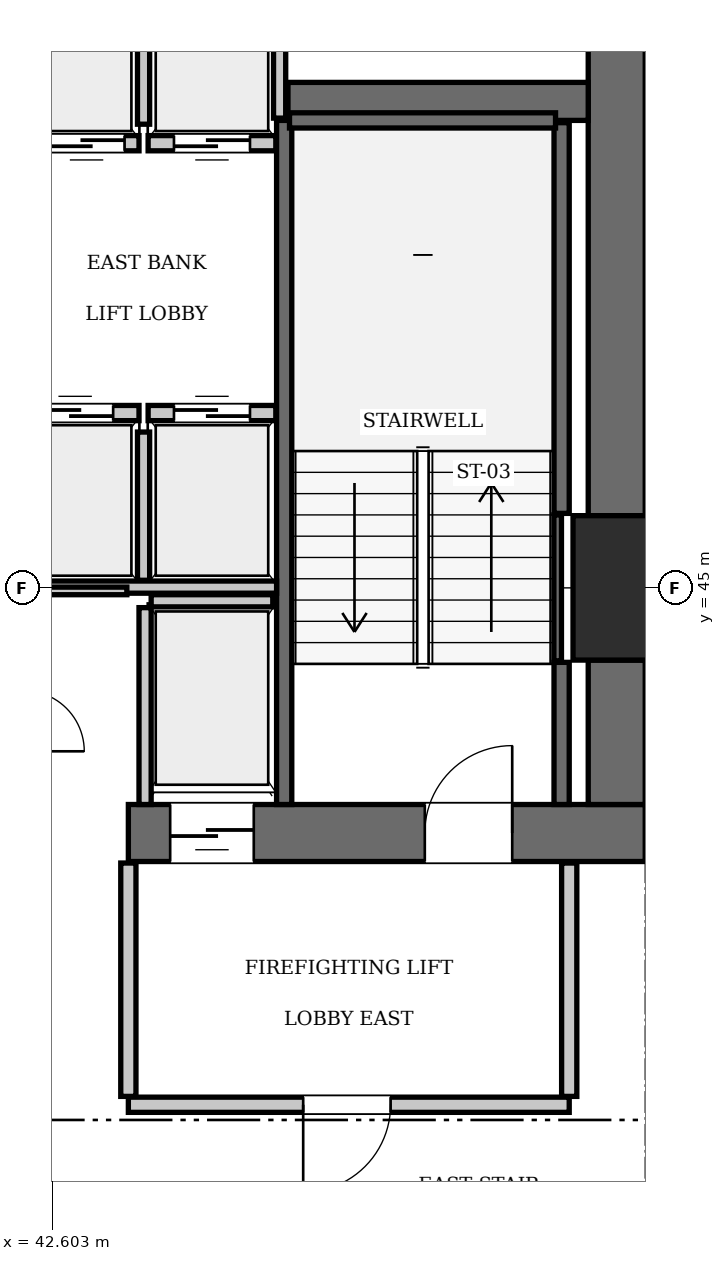
"""IFC4 building model, lengths in metres.
Left out: names, types, materials, properties, quantities, classifications, styles, units other than length and angle.
Written with IfcOpenShell. Run it as: python <this file> out.ifc"""

import sys

from ifc_helpers import new_model, si_unit, direction, frame, frame_2d, origin, origin_2d, place, context, subcontext, project, spatial, rectangle, extrude, element, fill, save


model = new_model("IFC4")
c1 = context("Model", 3, precision=1e-05, world=origin(), true_north=direction((0.0, 1.0)))
c2 = subcontext(c1, "Body", "Model", "MODEL_VIEW")
j1 = project(units=[si_unit("LENGTHUNIT", "METRE"), si_unit("PLANEANGLEUNIT", "RADIAN")], contexts=[c1])
p1 = place(None, origin())
s1 = spatial("IfcSite", under=j1, at=p1, CompositionType="ELEMENT")
p2 = place(p1, origin())
s2 = spatial("IfcBuilding", under=s1, at=p2, CompositionType="ELEMENT")
p3 = place(p2, frame((0.0, 0.0, 192.85)))
s3 = spatial("IfcBuildingStorey", under=s2, at=p3, CompositionType="ELEMENT", Elevation=192.85)
p4 = place(p3, frame((50.4, 45.0, 0.0), z_axis=(0.0, 0.0, 1.0), x_axis=(1.0, 0.0, 0.0)))
e1 = element("IfcColumn", 1, at=p4, inside=s3, PredefinedType="COLUMN", context=c2, shape_type="SweptSolid", body=[
    extrude(rectangle(XDim=1.9, YDim=1.9, at=origin_2d()), origin(), (0.0, 0.0, 1.0), 3.85),
])
p5 = place(p3, frame((43.6, 41.775, 0.0), z_axis=(0.0, 0.0, 1.0), x_axis=(1.0, 0.0, 0.0)))
e2 = element("IfcWall", 2, at=p5, inside=s3, PredefinedType="SHEAR", context=c2, shape_type="SweptSolid", body=[
    extrude(rectangle(XDim=6.8, YDim=0.75, at=frame_2d((3.4, 0.0))), origin(), (0.0, 0.0, 1.0), 3.85),
])
p6 = place(p5, frame((3.9, 0.0, 0.0)))
e3 = element("IfcOpeningElement", 3, at=p6, cuts=e2, PredefinedType="OPENING", context=c2, shape_type="SweptSolid", body=[
    extrude(rectangle(XDim=1.15, YDim=2.15, at=frame_2d((0.575, 1.075))), frame((0.0, 0.385, 0.0), z_axis=(0.0, -1.0, 0.0), x_axis=(1.0, 0.0, 0.0)), (0.0, 0.0, 1.0), 0.77),
])
p7 = place(p5, frame((0.55, 0.0, 0.0)))
e4 = element("IfcOpeningElement", 4, at=p7, cuts=e2, PredefinedType="OPENING", context=c2, shape_type="SweptSolid", body=[
    extrude(rectangle(XDim=1.1, YDim=2.2, at=frame_2d((0.55, 1.1))), frame((0.0, 0.385, 0.0), z_axis=(0.0, -1.0, 0.0), x_axis=(1.0, 0.0, 0.0)), (0.0, 0.0, 1.0), 0.77),
])
p8 = place(p3, frame((50.025, 42.15, 0.0), z_axis=(0.0, 0.0, 1.0), x_axis=(0.0, 1.0, 0.0)))
e5 = element("IfcWall", 5, at=p8, inside=s3, PredefinedType="SHEAR", context=c2, shape_type="SweptSolid", body=[
    extrude(rectangle(XDim=1.9, YDim=0.75, at=frame_2d((0.95, 0.0))), origin(), (0.0, 0.0, 1.0), 3.85),
])
p9 = place(p3, frame((50.025, 45.95, 0.0), z_axis=(0.0, 0.0, 1.0), x_axis=(0.0, 1.0, 0.0)))
e6 = element("IfcWall", 6, at=p9, inside=s3, PredefinedType="SHEAR", context=c2, shape_type="SweptSolid", body=[
    extrude(rectangle(XDim=7.3, YDim=0.75, at=frame_2d((3.65, 0.0))), origin(), (0.0, 0.0, 1.0), 3.85),
])
p10 = place(p3, frame((45.7, 51.4, 0.0), z_axis=(0.0, 0.0, 1.0), x_axis=(1.0, 0.0, 0.0)))
e7 = element("IfcWall", 7, at=p10, inside=s3, PredefinedType="SHEAR", context=c2, shape_type="SweptSolid", body=[
    extrude(rectangle(XDim=3.95, YDim=0.5, at=frame_2d((1.975, 0.0))), origin(), (0.0, 0.0, 1.0), 3.85),
])
p11 = place(p3, frame((45.65, 42.15, 0.0), z_axis=(0.0, 0.0, 1.0), x_axis=(0.0, 1.0, 0.0)))
e8 = element("IfcWall", 8, at=p11, inside=s3, PredefinedType="SOLIDWALL", context=c2, shape_type="SweptSolid", body=[
    extrude(rectangle(XDim=9.0, YDim=0.2, at=frame_2d((4.5, 0.0))), origin(), (0.0, 0.0, 1.0), 3.61),
])
p12 = place(p3, frame((49.3, 42.15, 0.0), z_axis=(0.0, 0.0, 1.0), x_axis=(0.0, 1.0, 0.0)))
e9 = element("IfcWall", 9, at=p12, inside=s3, PredefinedType="SOLIDWALL", context=c2, shape_type="SweptSolid", body=[
    extrude(rectangle(XDim=1.87, YDim=0.2, at=frame_2d((0.935, 0.0))), origin(), (0.0, 0.0, 1.0), 3.61),
])
p13 = place(p3, frame((49.3, 45.98, 0.0), z_axis=(0.0, 0.0, 1.0), x_axis=(0.0, 1.0, 0.0)))
e10 = element("IfcWall", 10, at=p13, inside=s3, PredefinedType="SOLIDWALL", context=c2, shape_type="SweptSolid", body=[
    extrude(rectangle(XDim=5.14, YDim=0.2, at=frame_2d((2.57, 0.0))), origin(), (0.0, 0.0, 1.0), 3.61),
])
p14 = place(p3, frame((45.72, 51.15, 0.0), z_axis=(0.0, 0.0, 1.0), x_axis=(1.0, 0.0, 0.0)))
e11 = element("IfcWall", 11, at=p14, inside=s3, PredefinedType="SOLIDWALL", context=c2, shape_type="SweptSolid", body=[
    extrude(rectangle(XDim=3.5, YDim=0.2, at=frame_2d((1.75, 0.0))), origin(), (0.0, 0.0, 1.0), 3.61),
])
p15 = place(p3, frame((49.248, 44.04, 0.0), z_axis=(0.0, 0.0, 1.0), x_axis=(0.0, 1.0, 0.0)))
e12 = element("IfcWall", 12, at=p15, inside=s3, PredefinedType="SOLIDWALL", context=c2, shape_type="SweptSolid", body=[
    extrude(rectangle(XDim=1.92, YDim=0.1, at=frame_2d((0.96, 0.0))), origin(), (0.0, 0.0, 1.0), 3.61),
])
p16 = place(p3, frame((42.06, 47.3, 0.0), z_axis=(0.0, 0.0, 1.0), x_axis=(1.0, 0.0, 0.0)))
e13 = element("IfcWall", 13, at=p16, inside=s3, PredefinedType="SOLIDWALL", context=c2, shape_type="SweptSolid", body=[
    extrude(rectangle(XDim=1.68, YDim=0.2, at=frame_2d((0.84, 0.0))), origin(), (0.0, 0.0, 1.0), 3.61),
])
p17 = place(p16, frame((0.34, 0.0, 0.0)))
e14 = element("IfcOpeningElement", 14, at=p17, cuts=e13, PredefinedType="OPENING", context=c2, shape_type="SweptSolid", body=[
    extrude(rectangle(XDim=1.0, YDim=2.15, at=frame_2d((0.5, 1.075))), frame((0.0, 0.11, 0.0), z_axis=(0.0, -1.0, 0.0), x_axis=(1.0, 0.0, 0.0)), (0.0, 0.0, 1.0), 0.22),
])
p18 = place(p3, frame((43.86, 47.3, 0.0), z_axis=(0.0, 0.0, 1.0), x_axis=(1.0, 0.0, 0.0)))
e15 = element("IfcWall", 15, at=p18, inside=s3, PredefinedType="SOLIDWALL", context=c2, shape_type="SweptSolid", body=[
    extrude(rectangle(XDim=1.68, YDim=0.2, at=frame_2d((0.84, 0.0))), origin(), (0.0, 0.0, 1.0), 3.61),
])
p19 = place(p18, frame((0.34, 0.0, 0.0)))
e16 = element("IfcOpeningElement", 16, at=p19, cuts=e15, PredefinedType="OPENING", context=c2, shape_type="SweptSolid", body=[
    extrude(rectangle(XDim=1.0, YDim=2.15, at=frame_2d((0.5, 1.075))), frame((0.0, 0.11, 0.0), z_axis=(0.0, -1.0, 0.0), x_axis=(1.0, 0.0, 0.0)), (0.0, 0.0, 1.0), 0.22),
])
p20 = place(p3, frame((42.36, 50.85, 0.0), z_axis=(0.0, 0.0, 1.0), x_axis=(1.0, 0.0, 0.0)))
e17 = element("IfcWall", 17, at=p20, inside=s3, PredefinedType="SOLIDWALL", context=c2, shape_type="SweptSolid", body=[
    extrude(rectangle(XDim=1.38, YDim=0.2, at=frame_2d((0.69, 0.0))), origin(), (0.0, 0.0, 1.0), 3.61),
])
p21 = place(p20, frame((0.19, 0.0, 0.0)))
e18 = element("IfcOpeningElement", 18, at=p21, cuts=e17, PredefinedType="OPENING", context=c2, shape_type="SweptSolid", body=[
    extrude(rectangle(XDim=1.0, YDim=2.15, at=frame_2d((0.5, 1.075))), frame((0.0, 0.11, 0.0), z_axis=(0.0, -1.0, 0.0), x_axis=(1.0, 0.0, 0.0)), (0.0, 0.0, 1.0), 0.22),
])
p22 = place(p3, frame((43.86, 50.85, 0.0), z_axis=(0.0, 0.0, 1.0), x_axis=(1.0, 0.0, 0.0)))
e19 = element("IfcWall", 19, at=p22, inside=s3, PredefinedType="SOLIDWALL", context=c2, shape_type="SweptSolid", body=[
    extrude(rectangle(XDim=1.68, YDim=0.2, at=frame_2d((0.84, 0.0))), origin(), (0.0, 0.0, 1.0), 3.61),
])
p23 = place(p22, frame((0.34, 0.0, 0.0)))
e20 = element("IfcOpeningElement", 20, at=p23, cuts=e19, PredefinedType="OPENING", context=c2, shape_type="SweptSolid", body=[
    extrude(rectangle(XDim=1.0, YDim=2.15, at=frame_2d((0.5, 1.075))), frame((0.0, 0.11, 0.0), z_axis=(0.0, -1.0, 0.0), x_axis=(1.0, 0.0, 0.0)), (0.0, 0.0, 1.0), 0.22),
])
p24 = place(p3, frame((43.9, 44.83, 0.0), z_axis=(0.0, 0.0, 1.0), x_axis=(1.0, 0.0, 0.0)))
e21 = element("IfcWall", 21, at=p24, inside=s3, PredefinedType="SOLIDWALL", context=c2, shape_type="SweptSolid", body=[
    extrude(rectangle(XDim=1.6, YDim=0.16, at=frame_2d((0.8, 0.0))), origin(), (0.0, 0.0, 1.0), 3.61),
])
p25 = place(p3, frame((43.82, 42.15, 0.0), z_axis=(0.0, 0.0, 1.0), x_axis=(0.0, 1.0, 0.0)))
e22 = element("IfcWall", 22, at=p25, inside=s3, PredefinedType="SOLIDWALL", context=c2, shape_type="SweptSolid", body=[
    extrude(rectangle(XDim=2.59, YDim=0.16, at=frame_2d((1.295, 0.0))), origin(), (0.0, 0.0, 1.0), 3.61),
])
p26 = place(p3, frame((43.8, 45.1, 0.0), z_axis=(0.0, 0.0, 1.0), x_axis=(0.0, 1.0, 0.0)))
e23 = element("IfcWall", 23, at=p26, inside=s3, PredefinedType="SOLIDWALL", context=c2, shape_type="SweptSolid", body=[
    extrude(rectangle(XDim=1.95, YDim=0.16, at=frame_2d((0.975, 0.0))), origin(), (0.0, 0.0, 1.0), 3.61),
])
p27 = place(p3, frame((42.1, 45.01, 0.0), z_axis=(0.0, 0.0, 1.0), x_axis=(1.0, 0.0, 0.0)))
e24 = element("IfcWall", 24, at=p27, inside=s3, PredefinedType="SOLIDWALL", context=c2, shape_type="SweptSolid", body=[
    extrude(rectangle(XDim=3.45, YDim=0.16, at=frame_2d((1.725, 0.0))), origin(), (0.0, 0.0, 1.0), 3.61),
])
p28 = place(p3, frame((45.59, 51.18, 0.0), z_axis=(0.0, 0.0, 1.0), x_axis=(0.0, 1.0, 0.0)))
e25 = element("IfcWall", 25, at=p28, inside=s3, PredefinedType="SOLIDWALL", context=c2, shape_type="SweptSolid", body=[
    extrude(rectangle(XDim=2.07, YDim=0.16, at=frame_2d((1.035, 0.0))), origin(), (0.0, 0.0, 1.0), 3.61),
])
p29 = place(p3, frame((43.8, 51.1, 0.0), z_axis=(0.0, 0.0, 1.0), x_axis=(0.0, 1.0, 0.0)))
e26 = element("IfcWall", 26, at=p29, inside=s3, PredefinedType="SOLIDWALL", context=c2, shape_type="SweptSolid", body=[
    extrude(rectangle(XDim=2.15, YDim=0.16, at=frame_2d((1.075, 0.0))), origin(), (0.0, 0.0, 1.0), 3.61),
])
p30 = place(p3, frame((43.6, 38.2, 0.0), z_axis=(0.0, 0.0, 1.0), x_axis=(1.0, 0.0, 0.0)))
e27 = element("IfcWall", 27, at=p30, inside=s3, PredefinedType="PARTITIONING", context=c2, shape_type="SweptSolid", body=[
    extrude(rectangle(XDim=5.8, YDim=0.2, at=frame_2d((2.9, 0.0))), origin(), (0.0, 0.0, 1.0), 3.61),
])
p31 = place(p30, frame((2.3, 0.0, 0.0)))
e28 = element("IfcOpeningElement", 28, at=p31, cuts=e27, PredefinedType="OPENING", context=c2, shape_type="SweptSolid", body=[
    extrude(rectangle(XDim=1.15, YDim=2.15, at=frame_2d((0.575, 1.075))), frame((0.0, 0.11, 0.0), z_axis=(0.0, -1.0, 0.0), x_axis=(1.0, 0.0, 0.0)), (0.0, 0.0, 1.0), 0.22),
])
for number, where, z_axis, x_axis in (
    (29, (43.6, 38.31, 0.0), (0.0, 0.0, 1.0), (0.0, 1.0, 0.0)),
    (30, (49.4, 38.31, 0.0), (0.0, 0.0, 1.0), (0.0, 1.0, 0.0)),
):
    element("IfcWall", number, at=place(p3, frame(where, z_axis=z_axis, x_axis=x_axis)), inside=s3, PredefinedType="PARTITIONING", context=c2, shape_type="SweptSolid", body=[
        extrude(rectangle(XDim=3.07, YDim=0.2, at=frame_2d((1.535, 0.0))), origin(), (0.0, 0.0, 1.0), 3.61),
    ])
p32 = place(p3, frame((42.28, 44.96, 0.0), z_axis=(0.0, 0.0, 1.0), x_axis=(1.0, 0.0, 0.0)))
e31 = element("IfcWall", 31, at=p32, inside=s3, PredefinedType="PARTITIONING", context=c2, shape_type="SweptSolid", body=[
    extrude(rectangle(XDim=1.3, YDim=0.1, at=frame_2d((0.65, 0.0))), origin(), (0.0, 0.0, 1.0), 3.61),
])
p33 = place(p6, origin())
e32 = element("IfcDoor", 32, at=p33, inside=s3, OperationType="SINGLE_SWING_RIGHT", PredefinedType="DOOR", context=c2, shape_type="SweptSolid", body=[
    extrude(rectangle(XDim=1.15, YDim=2.15, at=frame_2d((0.575, 1.075))), frame((0.0, 0.025, 0.0), z_axis=(0.0, -1.0, 0.0), x_axis=(1.0, 0.0, 0.0)), (0.0, 0.0, 1.0), 0.05),
])
fill(e3, e32)
p34 = place(p17, origin())
e33 = element("IfcDoor", 33, at=p34, inside=s3, OperationType="SLIDING_TO_LEFT", PredefinedType="DOOR", context=c2, shape_type="SweptSolid", body=[
    extrude(rectangle(XDim=1.0, YDim=2.15, at=frame_2d((0.5, 1.075))), frame((0.0, 0.025, 0.0), z_axis=(0.0, -1.0, 0.0), x_axis=(1.0, 0.0, 0.0)), (0.0, 0.0, 1.0), 0.05),
])
fill(e14, e33)
p35 = place(p19, origin())
e34 = element("IfcDoor", 34, at=p35, inside=s3, OperationType="SLIDING_TO_LEFT", PredefinedType="DOOR", context=c2, shape_type="SweptSolid", body=[
    extrude(rectangle(XDim=1.0, YDim=2.15, at=frame_2d((0.5, 1.075))), frame((0.0, 0.025, 0.0), z_axis=(0.0, -1.0, 0.0), x_axis=(1.0, 0.0, 0.0)), (0.0, 0.0, 1.0), 0.05),
])
fill(e16, e34)
p36 = place(p21, frame((1.0, 0.0, 0.0), z_axis=(0.0, 0.0, 1.0), x_axis=(-1.0, 0.0, 0.0)))
e35 = element("IfcDoor", 35, at=p36, inside=s3, OperationType="SLIDING_TO_LEFT", PredefinedType="DOOR", context=c2, shape_type="SweptSolid", body=[
    extrude(rectangle(XDim=1.0, YDim=2.15, at=frame_2d((0.5, 1.075))), frame((0.0, 0.025, 0.0), z_axis=(0.0, -1.0, 0.0), x_axis=(1.0, 0.0, 0.0)), (0.0, 0.0, 1.0), 0.05),
])
fill(e18, e35)
p37 = place(p23, frame((1.0, 0.0, 0.0), z_axis=(0.0, 0.0, 1.0), x_axis=(-1.0, 0.0, 0.0)))
e36 = element("IfcDoor", 36, at=p37, inside=s3, OperationType="SLIDING_TO_LEFT", PredefinedType="DOOR", context=c2, shape_type="SweptSolid", body=[
    extrude(rectangle(XDim=1.0, YDim=2.15, at=frame_2d((0.5, 1.075))), frame((0.0, 0.025, 0.0), z_axis=(0.0, -1.0, 0.0), x_axis=(1.0, 0.0, 0.0)), (0.0, 0.0, 1.0), 0.05),
])
fill(e20, e36)
p38 = place(p7, frame((1.1, 0.0, 0.0), z_axis=(0.0, 0.0, 1.0), x_axis=(-1.0, 0.0, 0.0)))
e37 = element("IfcDoor", 37, at=p38, inside=s3, OperationType="SLIDING_TO_LEFT", PredefinedType="DOOR", context=c2, shape_type="SweptSolid", body=[
    extrude(rectangle(XDim=1.1, YDim=2.2, at=frame_2d((0.55, 1.1))), frame((0.0, 0.025, 0.0), z_axis=(0.0, -1.0, 0.0), x_axis=(1.0, 0.0, 0.0)), (0.0, 0.0, 1.0), 0.05),
])
fill(e4, e37)
p39 = place(p31, frame((1.15, 0.0, 0.0), z_axis=(0.0, 0.0, 1.0), x_axis=(-1.0, 0.0, 0.0)))
e38 = element("IfcDoor", 38, at=p39, inside=s3, OperationType="SINGLE_SWING_RIGHT", PredefinedType="DOOR", context=c2, shape_type="SweptSolid", body=[
    extrude(rectangle(XDim=1.15, YDim=2.15, at=frame_2d((0.575, 1.075))), frame((0.0, 0.025, 0.0), z_axis=(0.0, -1.0, 0.0), x_axis=(1.0, 0.0, 0.0)), (0.0, 0.0, 1.0), 0.05),
])
fill(e28, e38)
save(model, sys.argv[1])
